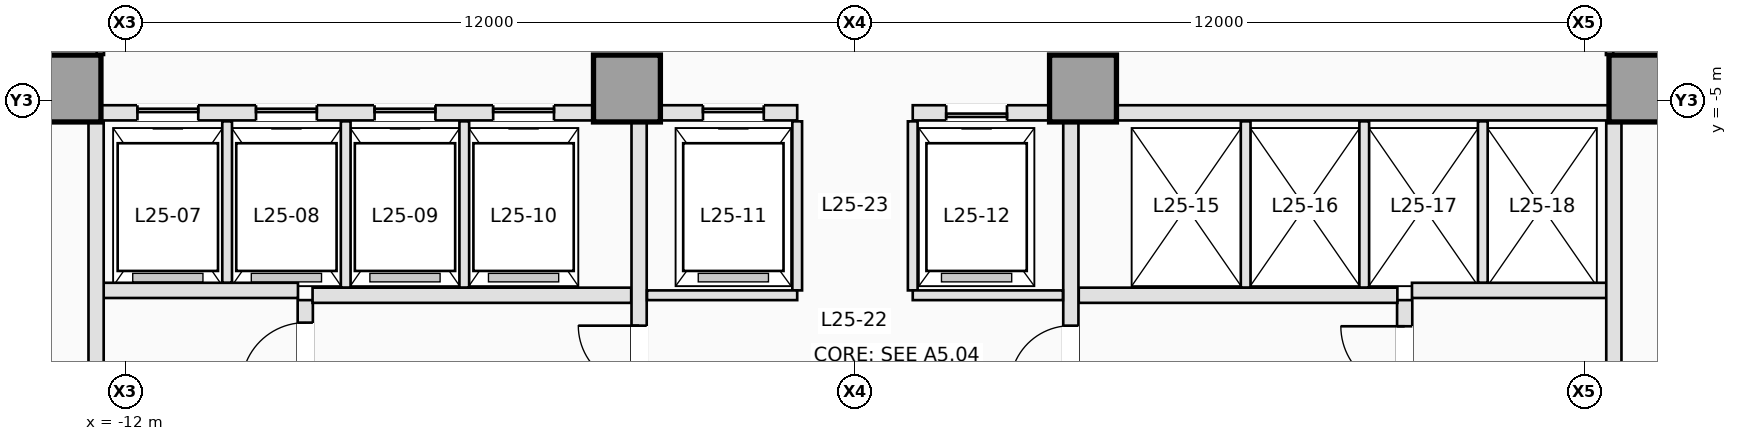
"""IFC4 building model, lengths in metres.
Left out: names, types, materials, properties, quantities, classifications, styles, units other than length and angle.
Written with IfcOpenShell. Run it as: python <this file> out.ifc"""

import sys

from ifc_helpers import new_model, si_unit, direction, frame, frame_2d, origin, origin_2d, place, context, subcontext, project, spatial, rectangle, extrude, element, fill, save


model = new_model("IFC4")
c1 = context("Model", 3, precision=1e-05, world=origin(), true_north=direction((0.0, 1.0)))
c2 = subcontext(c1, "Body", "Model", "MODEL_VIEW")
j1 = project(units=[si_unit("LENGTHUNIT", "METRE"), si_unit("PLANEANGLEUNIT", "RADIAN")], contexts=[c1])
p1 = place(None, origin())
s1 = spatial("IfcSite", under=j1, at=p1, CompositionType="ELEMENT")
p2 = place(p1, origin())
s2 = spatial("IfcBuilding", under=s1, at=p2, CompositionType="ELEMENT")
p3 = place(p2, frame((0.0, 0.0, 95.0)))
s3 = spatial("IfcBuildingStorey", under=s2, at=p3, CompositionType="ELEMENT", Elevation=95.0)
for number, where, z_axis, x_axis in (
    (1, (-12.95, -4.8, 0.0), (0.0, 0.0, 1.0), (1.0, 0.0, 0.0)),
    (2, (-3.75, -4.8, 0.0), (0.0, 0.0, 1.0), (1.0, 0.0, 0.0)),
    (3, (3.75, -4.8, 0.0), (0.0, 0.0, 1.0), (1.0, 0.0, 0.0)),
    (4, (12.95, -4.8, 0.0), (0.0, 0.0, 1.0), (1.0, 0.0, 0.0)),
):
    element("IfcColumn", number, at=place(p3, frame(where, z_axis=z_axis, x_axis=x_axis)), inside=s3, PredefinedType="COLUMN", context=c2, shape_type="SweptSolid", body=[
        extrude(rectangle(XDim=1.1, YDim=1.1, at=origin_2d()), origin(), (0.0, 0.0, 1.0), 3.5),
    ])
p4 = place(p3, frame((-9.04, -10.18, 0.0), z_axis=(0.0, 0.0, 1.0), x_axis=(0.0, 1.0, 0.0)))
e5 = element("IfcWall", 5, at=p4, inside=s3, PredefinedType="PARTITIONING", context=c2, shape_type="SweptSolid", body=[
    extrude(rectangle(XDim=1.9, YDim=0.25, at=frame_2d((0.95, 0.0))), origin(), (0.0, 0.0, 1.0), 3.25),
])
p5 = place(p4, frame((0.48, 0.0, 0.0)))
e6 = element("IfcOpeningElement", 6, at=p5, cuts=e5, PredefinedType="OPENING", context=c2, shape_type="SweptSolid", body=[
    extrude(rectangle(XDim=1.05, YDim=2.15, at=frame_2d((0.525, 1.075))), frame((0.0, 0.135, 0.0), z_axis=(0.0, -1.0, 0.0), x_axis=(1.0, 0.0, 0.0)), (0.0, 0.0, 1.0), 0.27),
])
p6 = place(p3, frame((9.04, -10.18, 0.0), z_axis=(0.0, 0.0, 1.0), x_axis=(0.0, 1.0, 0.0)))
e7 = element("IfcWall", 7, at=p6, inside=s3, PredefinedType="PARTITIONING", context=c2, shape_type="SweptSolid", body=[
    extrude(rectangle(XDim=1.9, YDim=0.25, at=frame_2d((0.95, 0.0))), origin(), (0.0, 0.0, 1.0), 3.25),
])
p7 = place(p6, frame((0.42, 0.0, 0.0)))
e8 = element("IfcOpeningElement", 8, at=p7, cuts=e7, PredefinedType="OPENING", context=c2, shape_type="SweptSolid", body=[
    extrude(rectangle(XDim=1.05, YDim=2.15, at=frame_2d((0.525, 1.075))), frame((0.0, 0.135, 0.0), z_axis=(0.0, -1.0, 0.0), x_axis=(1.0, 0.0, 0.0)), (0.0, 0.0, 1.0), 0.27),
])
for number, where, z_axis, x_axis in (
    (9, (-12.38, -8.12, 0.0), (0.0, 0.0, 1.0), (1.0, 0.0, 0.0)),
    (10, (9.16, -8.12, 0.0), (0.0, 0.0, 1.0), (1.0, 0.0, 0.0)),
):
    element("IfcWall", number, at=place(p3, frame(where, z_axis=z_axis, x_axis=x_axis)), inside=s3, PredefinedType="PARTITIONING", context=c2, shape_type="SweptSolid", body=[
        extrude(rectangle(XDim=3.22, YDim=0.25, at=frame_2d((1.61, 0.0))), origin(), (0.0, 0.0, 1.0), 3.25),
    ])
for number, where, z_axis, x_axis in (
    (11, (-12.48, -10.18, 0.0), (0.0, 0.0, 1.0), (0.0, 1.0, 0.0)),
    (12, (12.48, -10.18, 0.0), (0.0, 0.0, 1.0), (0.0, 1.0, 0.0)),
):
    element("IfcWall", number, at=place(p3, frame(where, z_axis=z_axis, x_axis=x_axis)), inside=s3, PredefinedType="PARTITIONING", context=c2, shape_type="SweptSolid", body=[
        extrude(rectangle(XDim=4.828, YDim=0.25, at=frame_2d((2.414, 0.0))), origin(), (0.0, 0.0, 1.0), 3.25),
    ])
for number, where, z_axis, x_axis in (
    (13, (-8.92, -8.2, 0.0), (0.0, 0.0, 1.0), (1.0, 0.0, 0.0)),
    (14, (3.68, -8.2, 0.0), (0.0, 0.0, 1.0), (1.0, 0.0, 0.0)),
):
    element("IfcWall", number, at=place(p3, frame(where, z_axis=z_axis, x_axis=x_axis)), inside=s3, PredefinedType="PARTITIONING", context=c2, shape_type="SweptSolid", body=[
        extrude(rectangle(XDim=5.24, YDim=0.25, at=frame_2d((2.62, 0.0))), origin(), (0.0, 0.0, 1.0), 3.25),
    ])
p8 = place(p3, frame((-3.55, -15.798, 0.0), z_axis=(0.0, 0.0, 1.0), x_axis=(0.0, 1.0, 0.0)))
e15 = element("IfcWall", 15, at=p8, inside=s3, PredefinedType="PARTITIONING", context=c2, shape_type="SweptSolid", body=[
    extrude(rectangle(XDim=10.446, YDim=0.25, at=frame_2d((5.223, 0.0))), origin(), (0.0, 0.0, 1.0), 3.25),
])
p9 = place(p8, frame((6.098, 0.0, 0.0)))
e16 = element("IfcOpeningElement", 16, at=p9, cuts=e15, PredefinedType="OPENING", context=c2, shape_type="SweptSolid", body=[
    extrude(rectangle(XDim=1.0, YDim=2.15, at=frame_2d((0.5, 1.075))), frame((0.0, 0.135, 0.0), z_axis=(0.0, -1.0, 0.0), x_axis=(1.0, 0.0, 0.0)), (0.0, 0.0, 1.0), 0.27),
])
p10 = place(p3, frame((3.55, -15.798, 0.0), z_axis=(0.0, 0.0, 1.0), x_axis=(0.0, 1.0, 0.0)))
e17 = element("IfcWall", 17, at=p10, inside=s3, PredefinedType="PARTITIONING", context=c2, shape_type="SweptSolid", body=[
    extrude(rectangle(XDim=10.446, YDim=0.25, at=frame_2d((5.223, 0.0))), origin(), (0.0, 0.0, 1.0), 3.25),
])
p11 = place(p10, frame((6.098, 0.0, 0.0)))
e18 = element("IfcOpeningElement", 18, at=p11, cuts=e17, PredefinedType="OPENING", context=c2, shape_type="SweptSolid", body=[
    extrude(rectangle(XDim=1.0, YDim=2.15, at=frame_2d((0.5, 1.075))), frame((0.0, 0.135, 0.0), z_axis=(0.0, -1.0, 0.0), x_axis=(1.0, 0.0, 0.0)), (0.0, 0.0, 1.0), 0.27),
])
p12 = place(p3, frame((-12.398, -5.2, 0.0), z_axis=(0.0, 0.0, 1.0), x_axis=(1.0, 0.0, 0.0)))
e19 = element("IfcWall", 19, at=p12, inside=s3, PredefinedType="PARTITIONING", context=c2, shape_type="SweptSolid", body=[
    extrude(rectangle(XDim=8.096, YDim=0.25, at=frame_2d((4.048, 0.0))), origin(), (0.0, 0.0, 1.0), 3.25),
])
p13 = place(p12, frame((0.598, 0.0, 0.0)))
e20 = element("IfcOpeningElement", 20, at=p13, cuts=e19, PredefinedType="OPENING", context=c2, shape_type="SweptSolid", body=[
    extrude(rectangle(XDim=1.0, YDim=2.15, at=frame_2d((0.5, 1.075))), frame((0.0, 0.135, 0.0), z_axis=(0.0, -1.0, 0.0), x_axis=(1.0, 0.0, 0.0)), (0.0, 0.0, 1.0), 0.27),
])
p14 = place(p12, frame((2.548, 0.0, 0.0)))
e21 = element("IfcOpeningElement", 21, at=p14, cuts=e19, PredefinedType="OPENING", context=c2, shape_type="SweptSolid", body=[
    extrude(rectangle(XDim=1.0, YDim=2.15, at=frame_2d((0.5, 1.075))), frame((0.0, 0.135, 0.0), z_axis=(0.0, -1.0, 0.0), x_axis=(1.0, 0.0, 0.0)), (0.0, 0.0, 1.0), 0.27),
])
p15 = place(p12, frame((4.498, 0.0, 0.0)))
e22 = element("IfcOpeningElement", 22, at=p15, cuts=e19, PredefinedType="OPENING", context=c2, shape_type="SweptSolid", body=[
    extrude(rectangle(XDim=1.0, YDim=2.15, at=frame_2d((0.5, 1.075))), frame((0.0, 0.135, 0.0), z_axis=(0.0, -1.0, 0.0), x_axis=(1.0, 0.0, 0.0)), (0.0, 0.0, 1.0), 0.27),
])
p16 = place(p12, frame((6.448, 0.0, 0.0)))
e23 = element("IfcOpeningElement", 23, at=p16, cuts=e19, PredefinedType="OPENING", context=c2, shape_type="SweptSolid", body=[
    extrude(rectangle(XDim=1.0, YDim=2.15, at=frame_2d((0.5, 1.075))), frame((0.0, 0.135, 0.0), z_axis=(0.0, -1.0, 0.0), x_axis=(1.0, 0.0, 0.0)), (0.0, 0.0, 1.0), 0.27),
])
p17 = place(p3, frame((4.302, -5.2, 0.0), z_axis=(0.0, 0.0, 1.0), x_axis=(1.0, 0.0, 0.0)))
e24 = element("IfcWall", 24, at=p17, inside=s3, PredefinedType="PARTITIONING", context=c2, shape_type="SweptSolid", body=[
    extrude(rectangle(XDim=8.096, YDim=0.25, at=frame_2d((4.048, 0.0))), origin(), (0.0, 0.0, 1.0), 3.25),
])
p18 = place(p3, frame((-3.198, -5.2, 0.0), z_axis=(0.0, 0.0, 1.0), x_axis=(1.0, 0.0, 0.0)))
e25 = element("IfcWall", 25, at=p18, inside=s3, PredefinedType="PARTITIONING", context=c2, shape_type="SweptSolid", body=[
    extrude(rectangle(XDim=2.248, YDim=0.25, at=frame_2d((1.124, 0.0))), origin(), (0.0, 0.0, 1.0), 3.25),
])
p19 = place(p18, frame((0.698, 0.0, 0.0)))
e26 = element("IfcOpeningElement", 26, at=p19, cuts=e25, PredefinedType="OPENING", context=c2, shape_type="SweptSolid", body=[
    extrude(rectangle(XDim=1.0, YDim=2.15, at=frame_2d((0.5, 1.075))), frame((0.0, 0.135, 0.0), z_axis=(0.0, -1.0, 0.0), x_axis=(1.0, 0.0, 0.0)), (0.0, 0.0, 1.0), 0.27),
])
p20 = place(p3, frame((0.95, -5.2, 0.0), z_axis=(0.0, 0.0, 1.0), x_axis=(1.0, 0.0, 0.0)))
e27 = element("IfcWall", 27, at=p20, inside=s3, PredefinedType="PARTITIONING", context=c2, shape_type="SweptSolid", body=[
    extrude(rectangle(XDim=2.248, YDim=0.25, at=frame_2d((1.124, 0.0))), origin(), (0.0, 0.0, 1.0), 3.25),
])
p21 = place(p20, frame((0.55, 0.0, 0.0)))
e28 = element("IfcOpeningElement", 28, at=p21, cuts=e27, PredefinedType="OPENING", context=c2, shape_type="SweptSolid", body=[
    extrude(rectangle(XDim=1.0, YDim=2.15, at=frame_2d((0.5, 1.075))), frame((0.0, 0.135, 0.0), z_axis=(0.0, -1.0, 0.0), x_axis=(1.0, 0.0, 0.0)), (0.0, 0.0, 1.0), 0.27),
])
p22 = place(p3, frame((-10.325, -7.993, 0.0), z_axis=(0.0, 0.0, 1.0), x_axis=(0.0, 1.0, 0.0)))
e29 = element("IfcWall", 29, at=p22, inside=s3, PredefinedType="PARTITIONING", context=c2, shape_type="SweptSolid", body=[
    extrude(rectangle(XDim=2.653, YDim=0.16, at=frame_2d((1.326, 0.0))), origin(), (0.0, 0.0, 1.0), 3.25),
])
for number, where, z_axis, x_axis in (
    (30, (-8.375, -8.073, 0.0), (0.0, 0.0, 1.0), (0.0, 1.0, 0.0)),
    (31, (-6.425, -8.073, 0.0), (0.0, 0.0, 1.0), (0.0, 1.0, 0.0)),
    (32, (6.425, -8.073, 0.0), (0.0, 0.0, 1.0), (0.0, 1.0, 0.0)),
    (33, (8.375, -8.073, 0.0), (0.0, 0.0, 1.0), (0.0, 1.0, 0.0)),
):
    element("IfcWall", number, at=place(p3, frame(where, z_axis=z_axis, x_axis=x_axis)), inside=s3, PredefinedType="PARTITIONING", context=c2, shape_type="SweptSolid", body=[
        extrude(rectangle(XDim=2.733, YDim=0.16, at=frame_2d((1.366, 0.0))), origin(), (0.0, 0.0, 1.0), 3.25),
    ])
p23 = place(p3, frame((10.325, -7.993, 0.0), z_axis=(0.0, 0.0, 1.0), x_axis=(0.0, 1.0, 0.0)))
e34 = element("IfcWall", 34, at=p23, inside=s3, PredefinedType="PARTITIONING", context=c2, shape_type="SweptSolid", body=[
    extrude(rectangle(XDim=2.653, YDim=0.16, at=frame_2d((1.326, 0.0))), origin(), (0.0, 0.0, 1.0), 3.25),
])
for number, where, z_axis, x_axis in (
    (35, (-0.95, -8.12, 0.0), (0.0, 0.0, 1.0), (0.0, 1.0, 0.0)),
    (36, (0.95, -8.12, 0.0), (0.0, 0.0, 1.0), (0.0, 1.0, 0.0)),
):
    element("IfcWall", number, at=place(p3, frame(where, z_axis=z_axis, x_axis=x_axis)), inside=s3, PredefinedType="PARTITIONING", context=c2, shape_type="SweptSolid", body=[
        extrude(rectangle(XDim=2.78, YDim=0.16, at=frame_2d((1.39, 0.0))), origin(), (0.0, 0.0, 1.0), 3.25),
    ])
for number, where, z_axis, x_axis in (
    (37, (-3.42, -8.2, 0.0), (0.0, 0.0, 1.0), (1.0, 0.0, 0.0)),
    (38, (0.95, -8.2, 0.0), (0.0, 0.0, 1.0), (1.0, 0.0, 0.0)),
):
    element("IfcWall", number, at=place(p3, frame(where, z_axis=z_axis, x_axis=x_axis)), inside=s3, PredefinedType="PARTITIONING", context=c2, shape_type="SweptSolid", body=[
        extrude(rectangle(XDim=2.47, YDim=0.16, at=frame_2d((1.235, 0.0))), origin(), (0.0, 0.0, 1.0), 3.25),
    ])
for number, where, z_axis, x_axis in (
    (39, (12.41, -2.462, 0.0), (0.0, 0.0, 1.0), (0.0, -1.0, 0.0)),
    (40, (-12.41, -4.248, 0.0), (0.0, 0.0, 1.0), (0.0, 1.0, 0.0)),
):
    element("IfcWall", number, at=place(p3, frame(where, z_axis=z_axis, x_axis=x_axis)), inside=s3, PredefinedType="PARTITIONING", context=c2, shape_type="SweptSolid", body=[
        extrude(rectangle(XDim=1.786, YDim=0.12, at=frame_2d((0.893, 0.0))), origin(), (0.0, 0.0, 1.0), 3.25),
    ])
p24 = place(p13, origin())
e41 = element("IfcDoor", 41, at=p24, inside=s3, OperationType="SLIDING_TO_LEFT", PredefinedType="DOOR", context=c2, shape_type="SweptSolid", body=[
    extrude(rectangle(XDim=1.0, YDim=2.15, at=frame_2d((0.5, 1.075))), frame((0.0, 0.025, 0.0), z_axis=(0.0, -1.0, 0.0), x_axis=(1.0, 0.0, 0.0)), (0.0, 0.0, 1.0), 0.05),
])
fill(e20, e41)
p25 = place(p14, origin())
e42 = element("IfcDoor", 42, at=p25, inside=s3, OperationType="SLIDING_TO_LEFT", PredefinedType="DOOR", context=c2, shape_type="SweptSolid", body=[
    extrude(rectangle(XDim=1.0, YDim=2.15, at=frame_2d((0.5, 1.075))), frame((0.0, 0.025, 0.0), z_axis=(0.0, -1.0, 0.0), x_axis=(1.0, 0.0, 0.0)), (0.0, 0.0, 1.0), 0.05),
])
fill(e21, e42)
p26 = place(p15, origin())
e43 = element("IfcDoor", 43, at=p26, inside=s3, OperationType="SLIDING_TO_LEFT", PredefinedType="DOOR", context=c2, shape_type="SweptSolid", body=[
    extrude(rectangle(XDim=1.0, YDim=2.15, at=frame_2d((0.5, 1.075))), frame((0.0, 0.025, 0.0), z_axis=(0.0, -1.0, 0.0), x_axis=(1.0, 0.0, 0.0)), (0.0, 0.0, 1.0), 0.05),
])
fill(e22, e43)
p27 = place(p16, origin())
e44 = element("IfcDoor", 44, at=p27, inside=s3, OperationType="SLIDING_TO_LEFT", PredefinedType="DOOR", context=c2, shape_type="SweptSolid", body=[
    extrude(rectangle(XDim=1.0, YDim=2.15, at=frame_2d((0.5, 1.075))), frame((0.0, 0.025, 0.0), z_axis=(0.0, -1.0, 0.0), x_axis=(1.0, 0.0, 0.0)), (0.0, 0.0, 1.0), 0.05),
])
fill(e23, e44)
p28 = place(p19, origin())
e45 = element("IfcDoor", 45, at=p28, inside=s3, OperationType="SLIDING_TO_LEFT", PredefinedType="DOOR", context=c2, shape_type="SweptSolid", body=[
    extrude(rectangle(XDim=1.0, YDim=2.15, at=frame_2d((0.5, 1.075))), frame((0.0, 0.025, 0.0), z_axis=(0.0, -1.0, 0.0), x_axis=(1.0, 0.0, 0.0)), (0.0, 0.0, 1.0), 0.05),
])
fill(e26, e45)
p29 = place(p21, origin())
e46 = element("IfcDoor", 46, at=p29, inside=s3, OperationType="SLIDING_TO_RIGHT", PredefinedType="DOOR", context=c2, shape_type="SweptSolid", body=[
    extrude(rectangle(XDim=1.0, YDim=2.15, at=frame_2d((0.5, 1.075))), frame((0.0, 0.025, 0.0), z_axis=(0.0, -1.0, 0.0), x_axis=(1.0, 0.0, 0.0)), (0.0, 0.0, 1.0), 0.05),
])
fill(e28, e46)
p30 = place(p5, origin())
e47 = element("IfcDoor", 47, at=p30, inside=s3, OperationType="SINGLE_SWING_LEFT", PredefinedType="DOOR", context=c2, shape_type="SweptSolid", body=[
    extrude(rectangle(XDim=1.05, YDim=2.15, at=frame_2d((0.525, 1.075))), frame((0.0, 0.025, 0.0), z_axis=(0.0, -1.0, 0.0), x_axis=(1.0, 0.0, 0.0)), (0.0, 0.0, 1.0), 0.05),
])
fill(e6, e47)
p31 = place(p7, origin())
e48 = element("IfcDoor", 48, at=p31, inside=s3, OperationType="SINGLE_SWING_RIGHT", PredefinedType="DOOR", context=c2, shape_type="SweptSolid", body=[
    extrude(rectangle(XDim=1.05, YDim=2.15, at=frame_2d((0.525, 1.075))), frame((0.0, 0.025, 0.0), z_axis=(0.0, -1.0, 0.0), x_axis=(1.0, 0.0, 0.0)), (0.0, 0.0, 1.0), 0.05),
])
fill(e8, e48)
p32 = place(p9, origin())
e49 = element("IfcDoor", 49, at=p32, inside=s3, OperationType="SINGLE_SWING_RIGHT", PredefinedType="DOOR", context=c2, shape_type="SweptSolid", body=[
    extrude(rectangle(XDim=1.0, YDim=2.15, at=frame_2d((0.5, 1.075))), frame((0.0, 0.025, 0.0), z_axis=(0.0, -1.0, 0.0), x_axis=(1.0, 0.0, 0.0)), (0.0, 0.0, 1.0), 0.05),
])
fill(e16, e49)
p33 = place(p11, origin())
e50 = element("IfcDoor", 50, at=p33, inside=s3, OperationType="SINGLE_SWING_LEFT", PredefinedType="DOOR", context=c2, shape_type="SweptSolid", body=[
    extrude(rectangle(XDim=1.0, YDim=2.15, at=frame_2d((0.5, 1.075))), frame((0.0, 0.025, 0.0), z_axis=(0.0, -1.0, 0.0), x_axis=(1.0, 0.0, 0.0)), (0.0, 0.0, 1.0), 0.05),
])
fill(e18, e50)
save(model, sys.argv[1])
